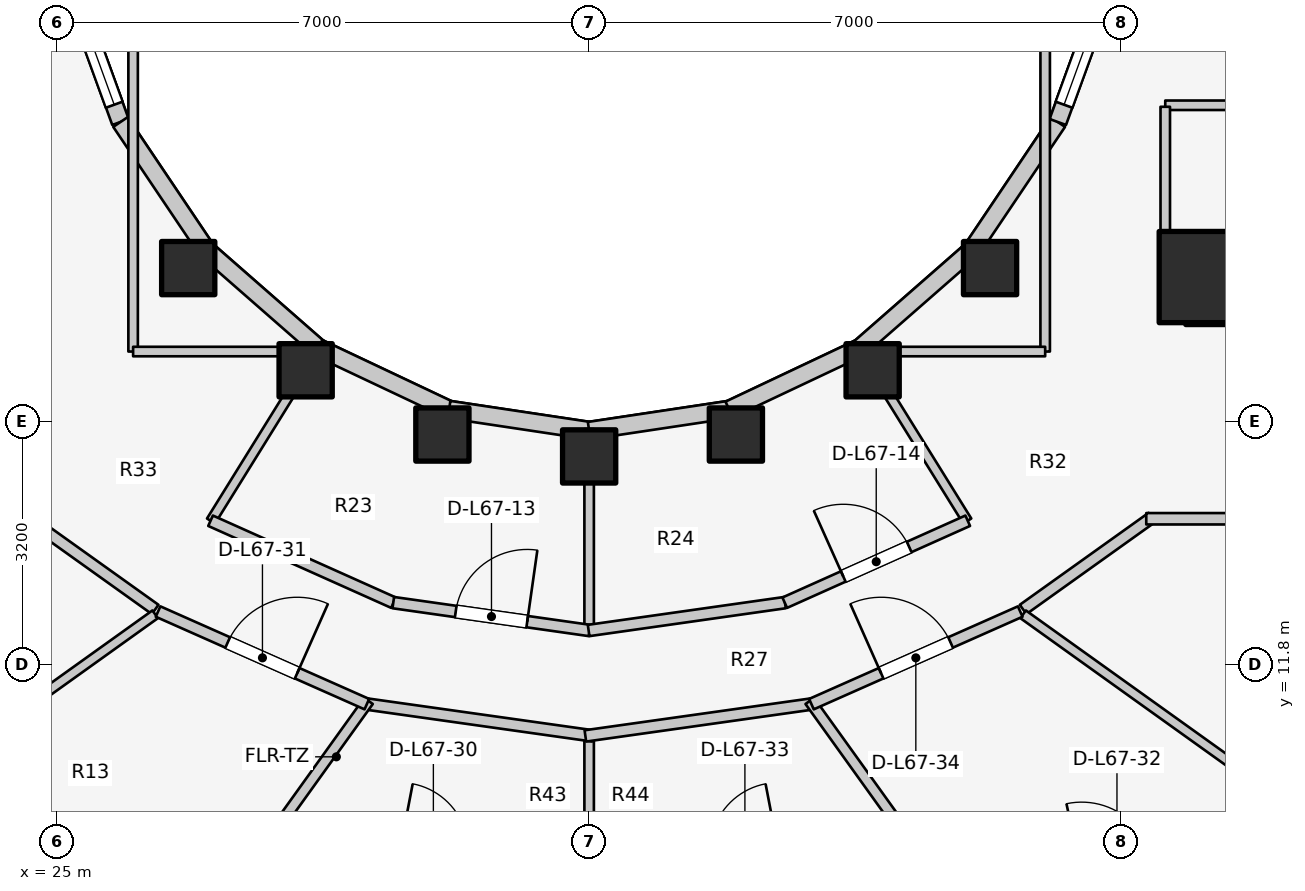
"""IFC4 building model, lengths in metres.
Left out: names, types, materials, properties, quantities, classifications, styles, units other than length and angle.
Written with IfcOpenShell. Run it as: python <this file> out.ifc"""

import sys

from ifc_helpers import new_model, si_unit, direction, frame, frame_2d, origin, origin_2d, place, context, subcontext, project, spatial, rectangle, extrude, element, fill, save


model = new_model("IFC4")
c1 = context("Model", 3, precision=1e-05, world=origin(), true_north=direction((0.0, 1.0)))
c2 = subcontext(c1, "Body", "Model", "MODEL_VIEW")
j1 = project(units=[si_unit("LENGTHUNIT", "METRE"), si_unit("PLANEANGLEUNIT", "RADIAN")], contexts=[c1])
p1 = place(None, origin())
s1 = spatial("IfcSite", under=j1, at=p1, CompositionType="ELEMENT")
p2 = place(p1, origin())
s2 = spatial("IfcBuilding", under=s1, at=p2, CompositionType="ELEMENT")
p3 = place(p2, frame((0.0, 0.0, 220.2)))
s3 = spatial("IfcBuildingStorey", under=s2, at=p3, CompositionType="ELEMENT", Elevation=220.2)
p4 = place(p3, frame((39.85, 16.55, 0.0), z_axis=(0.0, 0.0, 1.0), x_axis=(1.0, 0.0, 0.0)))
e1 = element("IfcWall", 1, at=p4, inside=s3, PredefinedType="SHEAR", context=c2, shape_type="SweptSolid", body=[
    extrude(rectangle(XDim=4.5, YDim=0.55, at=frame_2d((2.25, 0.0))), origin(), (0.0, 0.0, 1.0), 3.1),
])
p5 = place(p3, frame((40.1, 16.9, 0.0), z_axis=(0.0, 0.0, 1.0), x_axis=(1.0, 0.0, 0.0)))
e2 = element("IfcColumn", 2, at=p5, inside=s3, PredefinedType="COLUMN", context=c2, shape_type="SweptSolid", body=[
    extrude(rectangle(XDim=1.2, YDim=1.2, at=origin_2d()), origin(), (0.0, 0.0, 1.0), 3.1),
])
for number, where, z_axis, x_axis in (
    (3, (26.725, 17.018, 0.0), (0.0, 0.0, 1.0), (1.0, 0.0, 0.0)),
    (4, (28.27, 15.673, 0.0), (0.0, 0.0, 1.0), (1.0, 0.0, 0.0)),
    (5, (30.069, 14.828, 0.0), (0.0, 0.0, 1.0), (1.0, 0.0, 0.0)),
    (6, (32.0, 14.54, 0.0), (0.0, 0.0, 1.0), (1.0, 0.0, 0.0)),
    (7, (33.931, 14.828, 0.0), (0.0, 0.0, 1.0), (1.0, 0.0, 0.0)),
    (8, (35.73, 15.673, 0.0), (0.0, 0.0, 1.0), (1.0, 0.0, 0.0)),
    (9, (37.275, 17.018, 0.0), (0.0, 0.0, 1.0), (1.0, 0.0, 0.0)),
):
    element("IfcColumn", number, at=place(p3, frame(where, z_axis=z_axis, x_axis=x_axis)), inside=s3, PredefinedType="COLUMN", context=c2, shape_type="SweptSolid", body=[
        extrude(rectangle(XDim=0.7, YDim=0.7, at=origin_2d()), origin(), (0.0, 0.0, 1.0), 3.1),
    ])
p6 = place(p3, frame((25.123, 20.898, 0.0), z_axis=(0.0, 0.0, 1.0), x_axis=(0.341423187295, -0.93990968033, 0.0)))
e10 = element("IfcWall", 10, at=p6, inside=s3, PredefinedType="STANDARD", context=c2, shape_type="SweptSolid", body=[
    extrude(rectangle(XDim=2.084, YDim=0.23, at=frame_2d((1.042, 0.0))), origin(), (0.0, 0.0, 1.0), 2.84),
])
p7 = place(p6, frame((0.242, 0.0, 0.85)))
e11 = element("IfcOpeningElement", 11, at=p7, cuts=e10, PredefinedType="OPENING", context=c2, shape_type="SweptSolid", body=[
    extrude(rectangle(XDim=1.6, YDim=1.65, at=frame_2d((0.8, 0.825))), frame((0.0, 0.125, 0.0), z_axis=(0.0, -1.0, 0.0), x_axis=(1.0, 0.0, 0.0)), (0.0, 0.0, 1.0), 0.25),
])
p8 = place(p3, frame((25.834, 18.94, 0.0), z_axis=(0.0, 0.0, 1.0), x_axis=(0.558197800898, -0.829707909492, 0.0)))
e12 = element("IfcWall", 12, at=p8, inside=s3, PredefinedType="STANDARD", context=c2, shape_type="SweptSolid", body=[
    extrude(rectangle(XDim=2.027, YDim=0.23, at=frame_2d((1.013, 0.0))), origin(), (0.0, 0.0, 1.0), 2.16),
])
p9 = place(p3, frame((26.965, 17.258, 0.0), z_axis=(0.0, 0.0, 1.0), x_axis=(0.752576694707, -0.658504607869, 0.0)))
e13 = element("IfcWall", 13, at=p9, inside=s3, PredefinedType="STANDARD", context=c2, shape_type="SweptSolid", body=[
    extrude(rectangle(XDim=1.959, YDim=0.23, at=frame_2d((0.98, 0.0))), origin(), (0.0, 0.0, 1.0), 2.16),
])
p10 = place(p3, frame((28.44, 15.968, 0.0), z_axis=(0.0, 0.0, 1.0), x_axis=(0.904179699603, -0.427152280606, 0.0)))
e14 = element("IfcWall", 14, at=p10, inside=s3, PredefinedType="STANDARD", context=c2, shape_type="SweptSolid", body=[
    extrude(rectangle(XDim=1.899, YDim=0.23, at=frame_2d((0.95, 0.0))), origin(), (0.0, 0.0, 1.0), 2.16),
])
for number, where, z_axis, x_axis in (
    (15, (30.157, 15.157, 0.0), (0.0, 0.0, 1.0), (0.989, -0.149, 0.0)),
    (16, (32.0, 14.88, 0.0), (0.0, 0.0, 1.0), (0.989, 0.149, 0.0)),
):
    element("IfcWall", number, at=place(p3, frame(where, z_axis=z_axis, x_axis=x_axis)), inside=s3, PredefinedType="STANDARD", context=c2, shape_type="SweptSolid", body=[
        extrude(rectangle(XDim=1.864, YDim=0.23, at=frame_2d((0.932, 0.0))), origin(), (0.0, 0.0, 1.0), 2.16),
    ])
p11 = place(p3, frame((33.843, 15.157, 0.0), z_axis=(0.0, 0.0, 1.0), x_axis=(0.904179699603, 0.427152280606, 0.0)))
e17 = element("IfcWall", 17, at=p11, inside=s3, PredefinedType="STANDARD", context=c2, shape_type="SweptSolid", body=[
    extrude(rectangle(XDim=1.899, YDim=0.23, at=frame_2d((0.95, 0.0))), origin(), (0.0, 0.0, 1.0), 2.16),
])
p12 = place(p3, frame((35.56, 15.968, 0.0), z_axis=(0.0, 0.0, 1.0), x_axis=(0.752576694707, 0.658504607869, 0.0)))
e18 = element("IfcWall", 18, at=p12, inside=s3, PredefinedType="STANDARD", context=c2, shape_type="SweptSolid", body=[
    extrude(rectangle(XDim=1.959, YDim=0.23, at=frame_2d((0.98, 0.0))), origin(), (0.0, 0.0, 1.0), 2.16),
])
p13 = place(p3, frame((37.035, 17.258, 0.0), z_axis=(0.0, 0.0, 1.0), x_axis=(0.558197800898, 0.829707909492, 0.0)))
e19 = element("IfcWall", 19, at=p13, inside=s3, PredefinedType="STANDARD", context=c2, shape_type="SweptSolid", body=[
    extrude(rectangle(XDim=2.027, YDim=0.23, at=frame_2d((1.013, 0.0))), origin(), (0.0, 0.0, 1.0), 2.16),
])
p14 = place(p3, frame((38.166, 18.94, 0.0), z_axis=(0.0, 0.0, 1.0), x_axis=(0.341423187295, 0.93990968033, 0.0)))
e20 = element("IfcWall", 20, at=p14, inside=s3, PredefinedType="STANDARD", context=c2, shape_type="SweptSolid", body=[
    extrude(rectangle(XDim=2.084, YDim=0.23, at=frame_2d((1.042, 0.0))), origin(), (0.0, 0.0, 1.0), 2.84),
])
p15 = place(p14, frame((0.242, 0.0, 0.85)))
e21 = element("IfcOpeningElement", 21, at=p15, cuts=e20, PredefinedType="OPENING", context=c2, shape_type="SweptSolid", body=[
    extrude(rectangle(XDim=1.6, YDim=1.65, at=frame_2d((0.8, 0.825))), frame((0.0, 0.125, 0.0), z_axis=(0.0, -1.0, 0.0), x_axis=(1.0, 0.0, 0.0)), (0.0, 0.0, 1.0), 0.25),
])
p16 = place(p3, frame((39.58, 19.16, 0.0), z_axis=(0.0, 0.0, 1.0), x_axis=(1.0, 0.0, 0.0)))
e22 = element("IfcWall", 22, at=p16, inside=s3, PredefinedType="PARTITIONING", context=c2, shape_type="SweptSolid", body=[
    extrude(rectangle(XDim=4.87, YDim=0.125, at=frame_2d((2.435, 0.0))), origin(), (0.0, 0.0, 1.0), 2.12),
])
p17 = place(p16, frame((1.748, 0.0, 0.0)))
e23 = element("IfcOpeningElement", 23, at=p17, cuts=e22, PredefinedType="OPENING", context=c2, shape_type="SweptSolid", body=[
    extrude(rectangle(XDim=0.85, YDim=2.05, at=frame_2d((0.425, 1.025))), frame((0.0, 0.073, 0.0), z_axis=(0.0, -1.0, 0.0), x_axis=(1.0, 0.0, 0.0)), (0.0, 0.0, 1.0), 0.145),
])
p18 = place(p3, frame((39.58, 17.1, 0.0), z_axis=(0.0, 0.0, 1.0), x_axis=(0.0, 1.0, 0.0)))
e24 = element("IfcWall", 24, at=p18, inside=s3, PredefinedType="PARTITIONING", context=c2, shape_type="SweptSolid", body=[
    extrude(rectangle(XDim=2.04, YDim=0.125, at=frame_2d((1.02, 0.0))), origin(), (0.0, 0.0, 1.0), 2.232),
])
p19 = place(p3, frame((28.45, 15.985, 0.0), z_axis=(0.0, 0.0, 1.0), x_axis=(-0.527527080983, -0.849538215049, 0.0)))
e25 = element("IfcWall", 25, at=p19, inside=s3, PredefinedType="PARTITIONING", context=c2, shape_type="SweptSolid", body=[
    extrude(rectangle(XDim=2.701, YDim=0.125, at=frame_2d((1.351, 0.0))), origin(), (0.0, 0.0, 1.0), 2.376),
])
p20 = place(p3, frame((32.0, 14.9, 0.0), z_axis=(0.0, 0.0, 1.0), x_axis=(0.0, -1.0, 0.0)))
e26 = element("IfcWall", 26, at=p20, inside=s3, PredefinedType="PARTITIONING", context=c2, shape_type="SweptSolid", body=[
    extrude(rectangle(XDim=2.65, YDim=0.125, at=frame_2d((1.325, 0.0))), origin(), (0.0, 0.0, 1.0), 2.376),
])
p21 = place(p3, frame((35.55, 15.985, 0.0), z_axis=(0.0, 0.0, 1.0), x_axis=(0.527527080983, -0.849538215049, 0.0)))
e27 = element("IfcWall", 27, at=p21, inside=s3, PredefinedType="PARTITIONING", context=c2, shape_type="SweptSolid", body=[
    extrude(rectangle(XDim=2.701, YDim=0.125, at=frame_2d((1.351, 0.0))), origin(), (0.0, 0.0, 1.0), 2.376),
])
p22 = place(p3, frame((27.019, 13.694, 0.0), z_axis=(0.0, 0.0, 1.0), x_axis=(0.912628408652, -0.408790151203, 0.0)))
e28 = element("IfcWall", 28, at=p22, inside=s3, PredefinedType="PARTITIONING", context=c2, shape_type="SweptSolid", body=[
    extrude(rectangle(XDim=2.638, YDim=0.15, at=frame_2d((1.319, 0.0))), origin(), (0.0, 0.0, 1.0), 2.376),
])
p23 = place(p3, frame((29.423, 12.617, 0.0), z_axis=(0.0, 0.0, 1.0), x_axis=(0.990078185178, -0.140517569133, 0.0)))
e29 = element("IfcWall", 29, at=p23, inside=s3, PredefinedType="PARTITIONING", context=c2, shape_type="SweptSolid", body=[
    extrude(rectangle(XDim=2.61, YDim=0.15, at=frame_2d((1.305, 0.0))), origin(), (0.0, 0.0, 1.0), 2.376),
])
p24 = place(p23, frame((0.83, 0.0, 0.0)))
e30 = element("IfcOpeningElement", 30, at=p24, cuts=e29, PredefinedType="OPENING", context=c2, shape_type="SweptSolid", body=[
    extrude(rectangle(XDim=0.95, YDim=2.1, at=frame_2d((0.475, 1.05))), frame((0.0, 0.085, 0.0), z_axis=(0.0, -1.0, 0.0), x_axis=(1.0, 0.0, 0.0)), (0.0, 0.0, 1.0), 0.17),
])
p25 = place(p3, frame((31.993, 12.25, 0.0), z_axis=(0.0, 0.0, 1.0), x_axis=(0.990078185178, 0.140517569133, 0.0)))
e31 = element("IfcWall", 31, at=p25, inside=s3, PredefinedType="PARTITIONING", context=c2, shape_type="SweptSolid", body=[
    extrude(rectangle(XDim=2.61, YDim=0.15, at=frame_2d((1.305, 0.0))), origin(), (0.0, 0.0, 1.0), 2.376),
])
p26 = place(p3, frame((34.573, 12.616, 0.0), z_axis=(0.0, 0.0, 1.0), x_axis=(0.912628408652, 0.408790151203, 0.0)))
e32 = element("IfcWall", 32, at=p26, inside=s3, PredefinedType="PARTITIONING", context=c2, shape_type="SweptSolid", body=[
    extrude(rectangle(XDim=2.638, YDim=0.15, at=frame_2d((1.319, 0.0))), origin(), (0.0, 0.0, 1.0), 2.376),
])
p27 = place(p26, frame((0.844, 0.0, 0.0)))
e33 = element("IfcOpeningElement", 33, at=p27, cuts=e32, PredefinedType="OPENING", context=c2, shape_type="SweptSolid", body=[
    extrude(rectangle(XDim=0.95, YDim=2.1, at=frame_2d((0.475, 1.05))), frame((0.0, 0.085, 0.0), z_axis=(0.0, -1.0, 0.0), x_axis=(1.0, 0.0, 0.0)), (0.0, 0.0, 1.0), 0.17),
])
p28 = place(p3, frame((26.0, 15.92, 0.0), z_axis=(0.0, 0.0, 1.0), x_axis=(0.0, 1.0, 0.0)))
e34 = element("IfcWall", 34, at=p28, inside=s3, PredefinedType="PARTITIONING", context=c2, shape_type="SweptSolid", body=[
    extrude(rectangle(XDim=4.28, YDim=0.125, at=frame_2d((2.14, 0.0))), origin(), (0.0, 0.0, 1.0), 2.232),
])
p29 = place(p3, frame((26.0, 15.92, 0.0), z_axis=(0.0, 0.0, 1.0), x_axis=(1.0, 0.0, 0.0)))
e35 = element("IfcWall", 35, at=p29, inside=s3, PredefinedType="PARTITIONING", context=c2, shape_type="SweptSolid", body=[
    extrude(rectangle(XDim=2.6, YDim=0.125, at=frame_2d((1.3, 0.0))), origin(), (0.0, 0.0, 1.0), 2.232),
])
p30 = place(p3, frame((38.0, 15.92, 0.0), z_axis=(0.0, 0.0, 1.0), x_axis=(0.0, 1.0, 0.0)))
e36 = element("IfcWall", 36, at=p30, inside=s3, PredefinedType="PARTITIONING", context=c2, shape_type="SweptSolid", body=[
    extrude(rectangle(XDim=4.28, YDim=0.125, at=frame_2d((2.14, 0.0))), origin(), (0.0, 0.0, 1.0), 2.232),
])
p31 = place(p3, frame((35.4, 15.92, 0.0), z_axis=(0.0, 0.0, 1.0), x_axis=(1.0, 0.0, 0.0)))
e37 = element("IfcWall", 37, at=p31, inside=s3, PredefinedType="PARTITIONING", context=c2, shape_type="SweptSolid", body=[
    extrude(rectangle(XDim=2.6, YDim=0.125, at=frame_2d((1.3, 0.0))), origin(), (0.0, 0.0, 1.0), 2.232),
])
for number, where, z_axis, x_axis in (
    (38, (26.29, 12.527, 0.0), (0.0, 0.0, 1.0), (-0.814, 0.581, 0.0)),
    (39, (37.71, 12.527, 0.0), (0.0, 0.0, 1.0), (0.814, 0.581, 0.0)),
):
    element("IfcWall", number, at=place(p3, frame(where, z_axis=z_axis, x_axis=x_axis)), inside=s3, PredefinedType="PARTITIONING", context=c2, shape_type="SweptSolid", body=[
        extrude(rectangle(XDim=2.082, YDim=0.15, at=frame_2d((1.041, 0.0))), origin(), (0.0, 0.0, 1.0), 2.376),
    ])
p32 = place(p3, frame((39.33, 13.72, 0.0), z_axis=(0.0, 0.0, 1.0), x_axis=(1.0, 0.0, 0.0)))
e40 = element("IfcWall", 40, at=p32, inside=s3, PredefinedType="PARTITIONING", context=c2, shape_type="SweptSolid", body=[
    extrude(rectangle(XDim=7.52, YDim=0.15, at=frame_2d((3.76, 0.0))), origin(), (0.0, 0.0, 1.0), 2.376),
])
p33 = place(p32, frame((5.22, 0.0, 0.0)))
e41 = element("IfcOpeningElement", 41, at=p33, cuts=e40, PredefinedType="OPENING", context=c2, shape_type="SweptSolid", body=[
    extrude(rectangle(XDim=0.9, YDim=2.1, at=frame_2d((0.45, 1.05))), frame((0.0, 0.085, 0.0), z_axis=(0.0, -1.0, 0.0), x_axis=(1.0, 0.0, 0.0)), (0.0, 0.0, 1.0), 0.17),
])
p34 = place(p3, frame((26.29, 12.463, 0.0), z_axis=(0.0, 0.0, 1.0), x_axis=(-0.813163816543, -0.582034885093, 0.0)))
e42 = element("IfcWall", 42, at=p34, inside=s3, PredefinedType="PARTITIONING", context=c2, shape_type="SweptSolid", body=[
    extrude(rectangle(XDim=6.955, YDim=0.125, at=frame_2d((3.477, 0.0))), origin(), (0.0, 0.0, 1.0), 2.376),
])
p35 = place(p3, frame((32.0, 10.815, 0.0), z_axis=(0.0, 0.0, 1.0), x_axis=(0.0, -1.0, 0.0)))
e43 = element("IfcWall", 43, at=p35, inside=s3, PredefinedType="PARTITIONING", context=c2, shape_type="SweptSolid", body=[
    extrude(rectangle(XDim=5.715, YDim=0.125, at=frame_2d((2.857, 0.0))), origin(), (0.0, 0.0, 1.0), 2.376),
])
p36 = place(p3, frame((37.71, 12.463, 0.0), z_axis=(0.0, 0.0, 1.0), x_axis=(0.813163816543, -0.582034885093, 0.0)))
e44 = element("IfcWall", 44, at=p36, inside=s3, PredefinedType="PARTITIONING", context=c2, shape_type="SweptSolid", body=[
    extrude(rectangle(XDim=6.955, YDim=0.125, at=frame_2d((3.477, 0.0))), origin(), (0.0, 0.0, 1.0), 2.376),
])
p37 = place(p3, frame((29.018, 11.29, 0.0), z_axis=(0.0, 0.0, 1.0), x_axis=(0.990214091671, -0.13955662885, 0.0)))
e45 = element("IfcWall", 45, at=p37, inside=s3, PredefinedType="PARTITIONING", context=c2, shape_type="SweptSolid", body=[
    extrude(rectangle(XDim=3.062, YDim=0.15, at=frame_2d((1.531, 0.0))), origin(), (0.0, 0.0, 1.0), 2.376),
])
p38 = place(p3, frame((29.097, 11.324, 0.0), z_axis=(0.0, 0.0, 1.0), x_axis=(-0.583259891741, -0.812285601673, 0.0)))
e46 = element("IfcWall", 46, at=p38, inside=s3, PredefinedType="PLUMBINGWALL", context=c2, shape_type="SweptSolid", body=[
    extrude(rectangle(XDim=2.1, YDim=0.14, at=frame_2d((1.05, 0.0))), origin(), (0.0, 0.0, 1.0), 2.385),
])
p39 = place(p3, frame((26.328, 12.499, 0.0), z_axis=(0.0, 0.0, 1.0), x_axis=(0.914139569865, -0.405399613724, 0.0)))
e47 = element("IfcWall", 47, at=p39, inside=s3, PredefinedType="PARTITIONING", context=c2, shape_type="SweptSolid", body=[
    extrude(rectangle(XDim=3.005, YDim=0.15, at=frame_2d((1.502, 0.0))), origin(), (0.0, 0.0, 1.0), 2.376),
])
p40 = place(p39, frame((1.002, 0.0, 0.0)))
e48 = element("IfcOpeningElement", 48, at=p40, cuts=e47, PredefinedType="OPENING", context=c2, shape_type="SweptSolid", body=[
    extrude(rectangle(XDim=1.0, YDim=2.1, at=frame_2d((0.5, 1.05))), frame((0.0, 0.085, 0.0), z_axis=(0.0, -1.0, 0.0), x_axis=(1.0, 0.0, 0.0)), (0.0, 0.0, 1.0), 0.17),
])
p41 = place(p3, frame((31.95, 10.863, 0.0), z_axis=(0.0, 0.0, 1.0), x_axis=(0.990214091671, 0.13955662885, 0.0)))
e49 = element("IfcWall", 49, at=p41, inside=s3, PredefinedType="PARTITIONING", context=c2, shape_type="SweptSolid", body=[
    extrude(rectangle(XDim=3.062, YDim=0.15, at=frame_2d((1.531, 0.0))), origin(), (0.0, 0.0, 1.0), 2.376),
])
p42 = place(p3, frame((34.903, 11.324, 0.0), z_axis=(0.0, 0.0, 1.0), x_axis=(0.583259891741, -0.812285601673, 0.0)))
e50 = element("IfcWall", 50, at=p42, inside=s3, PredefinedType="PLUMBINGWALL", context=c2, shape_type="SweptSolid", body=[
    extrude(rectangle(XDim=2.1, YDim=0.14, at=frame_2d((1.05, 0.0))), origin(), (0.0, 0.0, 1.0), 2.385),
])
p43 = place(p3, frame((34.925, 11.281, 0.0), z_axis=(0.0, 0.0, 1.0), x_axis=(0.914139569865, 0.405399613724, 0.0)))
e51 = element("IfcWall", 51, at=p43, inside=s3, PredefinedType="PARTITIONING", context=c2, shape_type="SweptSolid", body=[
    extrude(rectangle(XDim=3.005, YDim=0.15, at=frame_2d((1.502, 0.0))), origin(), (0.0, 0.0, 1.0), 2.376),
])
p44 = place(p43, frame((1.002, 0.0, 0.0)))
e52 = element("IfcOpeningElement", 52, at=p44, cuts=e51, PredefinedType="OPENING", context=c2, shape_type="SweptSolid", body=[
    extrude(rectangle(XDim=1.0, YDim=2.1, at=frame_2d((0.5, 1.05))), frame((0.0, 0.085, 0.0), z_axis=(0.0, -1.0, 0.0), x_axis=(1.0, 0.0, 0.0)), (0.0, 0.0, 1.0), 0.17),
])
p45 = place(p7, origin())
e53 = element("IfcWindow", 53, at=p45, inside=s3, PartitioningType="SINGLE_PANEL", PredefinedType="WINDOW", context=c2, shape_type="SweptSolid", body=[
    extrude(rectangle(XDim=1.6, YDim=1.65, at=frame_2d((0.8, 0.825))), frame((0.0, 0.03, 0.0), z_axis=(0.0, -1.0, 0.0), x_axis=(1.0, 0.0, 0.0)), (0.0, 0.0, 1.0), 0.06),
])
fill(e11, e53)
p46 = place(p15, origin())
e54 = element("IfcWindow", 54, at=p46, inside=s3, PartitioningType="SINGLE_PANEL", PredefinedType="WINDOW", context=c2, shape_type="SweptSolid", body=[
    extrude(rectangle(XDim=1.6, YDim=1.65, at=frame_2d((0.8, 0.825))), frame((0.0, 0.03, 0.0), z_axis=(0.0, -1.0, 0.0), x_axis=(1.0, 0.0, 0.0)), (0.0, 0.0, 1.0), 0.06),
])
fill(e21, e54)
p47 = place(p24, origin())
e55 = element("IfcDoor", 55, at=p47, inside=s3, OperationType="SINGLE_SWING_RIGHT", PredefinedType="DOOR", context=c2, shape_type="SweptSolid", body=[
    extrude(rectangle(XDim=0.95, YDim=2.1, at=frame_2d((0.475, 1.05))), frame((0.0, 0.025, 0.0), z_axis=(0.0, -1.0, 0.0), x_axis=(1.0, 0.0, 0.0)), (0.0, 0.0, 1.0), 0.05),
])
fill(e30, e55)
p48 = place(p27, origin())
e56 = element("IfcDoor", 56, at=p48, inside=s3, OperationType="SINGLE_SWING_LEFT", PredefinedType="DOOR", context=c2, shape_type="SweptSolid", body=[
    extrude(rectangle(XDim=0.95, YDim=2.1, at=frame_2d((0.475, 1.05))), frame((0.0, 0.025, 0.0), z_axis=(0.0, -1.0, 0.0), x_axis=(1.0, 0.0, 0.0)), (0.0, 0.0, 1.0), 0.05),
])
fill(e33, e56)
p49 = place(p40, origin())
e57 = element("IfcDoor", 57, at=p49, inside=s3, OperationType="SINGLE_SWING_RIGHT", PredefinedType="DOOR", context=c2, shape_type="SweptSolid", body=[
    extrude(rectangle(XDim=1.0, YDim=2.1, at=frame_2d((0.5, 1.05))), frame((0.0, 0.025, 0.0), z_axis=(0.0, -1.0, 0.0), x_axis=(1.0, 0.0, 0.0)), (0.0, 0.0, 1.0), 0.05),
])
fill(e48, e57)
p50 = place(p44, origin())
e58 = element("IfcDoor", 58, at=p50, inside=s3, OperationType="SINGLE_SWING_LEFT", PredefinedType="DOOR", context=c2, shape_type="SweptSolid", body=[
    extrude(rectangle(XDim=1.0, YDim=2.1, at=frame_2d((0.5, 1.05))), frame((0.0, 0.025, 0.0), z_axis=(0.0, -1.0, 0.0), x_axis=(1.0, 0.0, 0.0)), (0.0, 0.0, 1.0), 0.05),
])
fill(e52, e58)
save(model, sys.argv[1])
